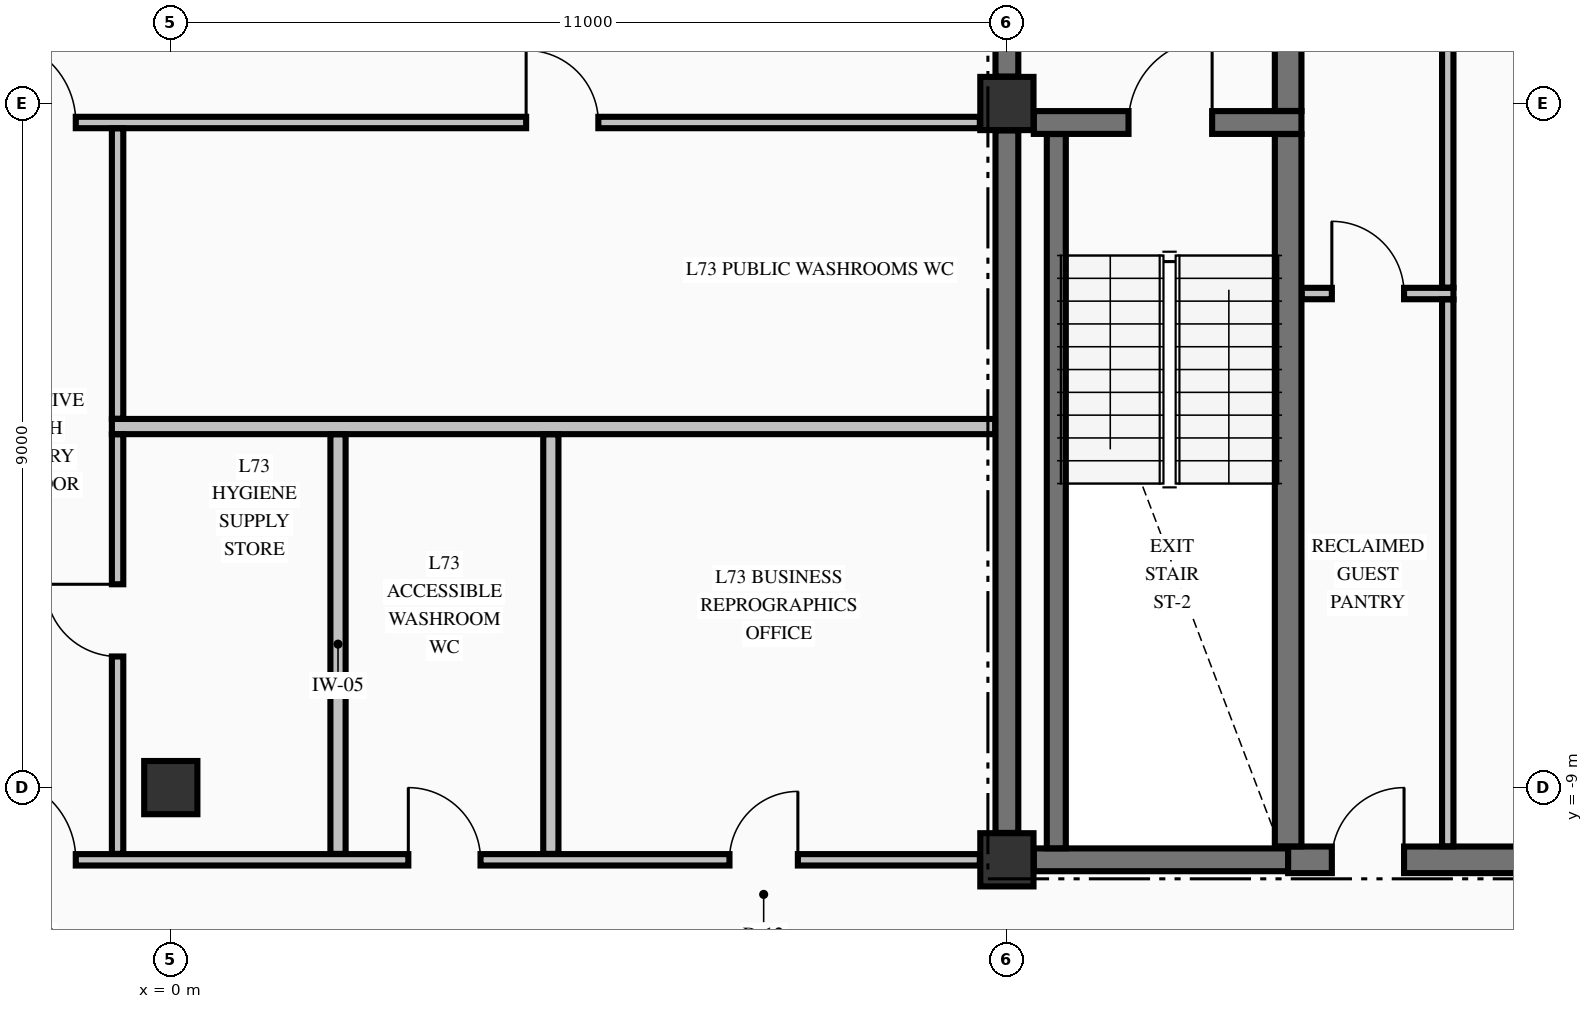
"""IFC4 building model, lengths in metres.
Left out: names, types, materials, properties, quantities, classifications, styles, units other than length and angle.
Written with IfcOpenShell. Run it as: python <this file> out.ifc"""

import sys

from ifc_helpers import new_model, si_unit, direction, frame, frame_2d, origin, origin_2d, place, context, subcontext, project, spatial, rectangle, extrude, element, fill, save


model = new_model("IFC4")
c1 = context("Model", 3, precision=1e-05, world=origin(), true_north=direction((0.0, 1.0)))
c2 = subcontext(c1, "Body", "Model", "MODEL_VIEW")
j1 = project(units=[si_unit("LENGTHUNIT", "METRE"), si_unit("PLANEANGLEUNIT", "RADIAN")], contexts=[c1])
p1 = place(None, origin())
s1 = spatial("IfcSite", under=j1, at=p1, CompositionType="ELEMENT")
p2 = place(p1, origin())
s2 = spatial("IfcBuilding", under=s1, at=p2, CompositionType="ELEMENT")
p3 = place(p2, frame((0.0, 0.0, 274.32)))
s3 = spatial("IfcBuildingStorey", under=s2, at=p3, CompositionType="ELEMENT", Elevation=274.32)
for number, where, z_axis, x_axis in (
    (1, (11.0, -9.95, -0.25), (0.0, 0.0, 1.0), (1.0, 0.0, 0.0)),
    (2, (11.0, 0.0, -0.25), (0.0, 0.0, 1.0), (1.0, 0.0, 0.0)),
    (3, (0.0, -9.0, -0.25), (0.0, 0.0, 1.0), (1.0, 0.0, 0.0)),
):
    element("IfcColumn", number, at=place(p3, frame(where, z_axis=z_axis, x_axis=x_axis)), inside=s3, PredefinedType="COLUMN", context=c2, shape_type="SweptSolid", body=[
        extrude(rectangle(XDim=0.7, YDim=0.7, at=origin_2d()), origin(), (0.0, 0.0, 1.0), 3.565),
    ])
p4 = place(p3, frame((11.354, -9.95, 0.0), z_axis=(0.0, 0.0, 1.0), x_axis=(1.0, 0.0, 0.0)))
e4 = element("IfcWall", 4, at=p4, inside=s3, PredefinedType="SHEAR", context=c2, shape_type="SweptSolid", body=[
    extrude(rectangle(XDim=3.346, YDim=0.3, at=frame_2d((1.673, 0.0))), origin(), (0.0, 0.0, 1.0), 3.315),
])
p5 = place(p3, frame((14.7, -9.95, 0.0), z_axis=(0.0, 0.0, 1.0), x_axis=(1.0, 0.0, 0.0)))
e5 = element("IfcWall", 5, at=p5, inside=s3, PredefinedType="SHEAR", context=c2, shape_type="SweptSolid", body=[
    extrude(rectangle(XDim=4.946, YDim=0.35, at=frame_2d((2.473, 0.0))), origin(), (0.0, 0.0, 1.0), 3.315),
])
p6 = place(p5, frame((3.25, 0.0, 0.0)))
e6 = element("IfcOpeningElement", 6, at=p6, cuts=e5, PredefinedType="OPENING", context=c2, shape_type="SweptSolid", body=[
    extrude(rectangle(XDim=0.9, YDim=2.15, at=frame_2d((0.45, 1.075))), frame((0.0, 0.185, 0.0), z_axis=(0.0, -1.0, 0.0), x_axis=(1.0, 0.0, 0.0)), (0.0, 0.0, 1.0), 0.37),
])
p7 = place(p5, frame((0.575, 0.0, 0.0)))
e7 = element("IfcOpeningElement", 7, at=p7, cuts=e5, PredefinedType="OPENING", context=c2, shape_type="SweptSolid", body=[
    extrude(rectangle(XDim=0.95, YDim=2.15, at=frame_2d((0.475, 1.075))), frame((0.0, 0.185, 0.0), z_axis=(0.0, -1.0, 0.0), x_axis=(1.0, 0.0, 0.0)), (0.0, 0.0, 1.0), 0.37),
])
p8 = place(p3, frame((11.354, -0.25, 0.0), z_axis=(0.0, 0.0, 1.0), x_axis=(1.0, 0.0, 0.0)))
e8 = element("IfcWall", 8, at=p8, inside=s3, PredefinedType="SHEAR", context=c2, shape_type="SweptSolid", body=[
    extrude(rectangle(XDim=3.521, YDim=0.3, at=frame_2d((1.76, 0.0))), origin(), (0.0, 0.0, 1.0), 3.315),
])
p9 = place(p8, frame((1.246, 0.0, 0.0)))
e9 = element("IfcOpeningElement", 9, at=p9, cuts=e8, PredefinedType="OPENING", context=c2, shape_type="SweptSolid", body=[
    extrude(rectangle(XDim=1.1, YDim=2.15, at=frame_2d((0.55, 1.075))), frame((0.0, 0.16, 0.0), z_axis=(0.0, -1.0, 0.0), x_axis=(1.0, 0.0, 0.0)), (0.0, 0.0, 1.0), 0.32),
])
p10 = place(p3, frame((-10.644, -9.95, 0.0), z_axis=(0.0, 0.0, 1.0), x_axis=(1.0, 0.0, 0.0)))
e10 = element("IfcWall", 10, at=p10, inside=s3, PredefinedType="PARTITIONING", context=c2, shape_type="SweptSolid", body=[
    extrude(rectangle(XDim=21.288, YDim=0.15, at=frame_2d((10.644, 0.0))), origin(), (0.0, 0.0, 1.0), 3.315),
])
p11 = place(p10, frame((8.294, 0.0, 0.0)))
e11 = element("IfcOpeningElement", 11, at=p11, cuts=e10, PredefinedType="OPENING", context=c2, shape_type="SweptSolid", body=[
    extrude(rectangle(XDim=1.1, YDim=2.15, at=frame_2d((0.55, 1.075))), frame((0.0, 0.085, 0.0), z_axis=(0.0, -1.0, 0.0), x_axis=(1.0, 0.0, 0.0)), (0.0, 0.0, 1.0), 0.17),
])
p12 = place(p10, frame((13.769, 0.0, 0.0)))
e12 = element("IfcOpeningElement", 12, at=p12, cuts=e10, PredefinedType="OPENING", context=c2, shape_type="SweptSolid", body=[
    extrude(rectangle(XDim=0.95, YDim=2.15, at=frame_2d((0.475, 1.075))), frame((0.0, 0.085, 0.0), z_axis=(0.0, -1.0, 0.0), x_axis=(1.0, 0.0, 0.0)), (0.0, 0.0, 1.0), 0.17),
])
p13 = place(p10, frame((17.994, 0.0, 0.0)))
e13 = element("IfcOpeningElement", 13, at=p13, cuts=e10, PredefinedType="OPENING", context=c2, shape_type="SweptSolid", body=[
    extrude(rectangle(XDim=0.9, YDim=2.15, at=frame_2d((0.45, 1.075))), frame((0.0, 0.085, 0.0), z_axis=(0.0, -1.0, 0.0), x_axis=(1.0, 0.0, 0.0)), (0.0, 0.0, 1.0), 0.17),
])
p14 = place(p3, frame((-0.775, -4.25, 0.0), z_axis=(0.0, 0.0, 1.0), x_axis=(1.0, 0.0, 0.0)))
e14 = element("IfcWall", 14, at=p14, inside=s3, PredefinedType="PARTITIONING", context=c2, shape_type="SweptSolid", body=[
    extrude(rectangle(XDim=11.622, YDim=0.2, at=frame_2d((5.811, 0.0))), origin(), (0.0, 0.0, 1.0), 3.315),
])
p15 = place(p3, frame((14.878, -2.5, 0.0), z_axis=(0.0, 0.0, 1.0), x_axis=(1.0, 0.0, 0.0)))
e15 = element("IfcWall", 15, at=p15, inside=s3, PredefinedType="PARTITIONING", context=c2, shape_type="SweptSolid", body=[
    extrude(rectangle(XDim=1.997, YDim=0.15, at=frame_2d((0.999, 0.0))), origin(), (0.0, 0.0, 1.0), 3.315),
])
p16 = place(p15, frame((0.397, 0.0, 0.0)))
e16 = element("IfcOpeningElement", 16, at=p16, cuts=e15, PredefinedType="OPENING", context=c2, shape_type="SweptSolid", body=[
    extrude(rectangle(XDim=0.95, YDim=2.15, at=frame_2d((0.475, 1.075))), frame((0.0, 0.085, 0.0), z_axis=(0.0, -1.0, 0.0), x_axis=(1.0, 0.0, 0.0)), (0.0, 0.0, 1.0), 0.17),
])
p17 = place(p3, frame((-10.644, -0.25, 0.0), z_axis=(0.0, 0.0, 1.0), x_axis=(1.0, 0.0, 0.0)))
e17 = element("IfcWall", 17, at=p17, inside=s3, PredefinedType="PARTITIONING", context=c2, shape_type="SweptSolid", body=[
    extrude(rectangle(XDim=21.288, YDim=0.15, at=frame_2d((10.644, 0.0))), origin(), (0.0, 0.0, 1.0), 3.315),
])
p18 = place(p17, frame((8.294, 0.0, 0.0)))
e18 = element("IfcOpeningElement", 18, at=p18, cuts=e17, PredefinedType="OPENING", context=c2, shape_type="SweptSolid", body=[
    extrude(rectangle(XDim=1.1, YDim=2.15, at=frame_2d((0.55, 1.075))), frame((0.0, 0.085, 0.0), z_axis=(0.0, -1.0, 0.0), x_axis=(1.0, 0.0, 0.0)), (0.0, 0.0, 1.0), 0.17),
])
p19 = place(p17, frame((3.169, 0.0, 0.0)))
e19 = element("IfcOpeningElement", 19, at=p19, cuts=e17, PredefinedType="OPENING", context=c2, shape_type="SweptSolid", body=[
    extrude(rectangle(XDim=1.05, YDim=2.15, at=frame_2d((0.525, 1.075))), frame((0.0, 0.085, 0.0), z_axis=(0.0, -1.0, 0.0), x_axis=(1.0, 0.0, 0.0)), (0.0, 0.0, 1.0), 0.17),
])
p20 = place(p17, frame((15.319, 0.0, 0.0)))
e20 = element("IfcOpeningElement", 20, at=p20, cuts=e17, PredefinedType="OPENING", context=c2, shape_type="SweptSolid", body=[
    extrude(rectangle(XDim=0.95, YDim=2.15, at=frame_2d((0.475, 1.075))), frame((0.0, 0.085, 0.0), z_axis=(0.0, -1.0, 0.0), x_axis=(1.0, 0.0, 0.0)), (0.0, 0.0, 1.0), 0.17),
])
p21 = place(p3, frame((11.0, -9.596, 0.0), z_axis=(0.0, 0.0, 1.0), x_axis=(0.0, 1.0, 0.0)))
e21 = element("IfcWall", 21, at=p21, inside=s3, PredefinedType="SHEAR", context=c2, shape_type="SweptSolid", body=[
    extrude(rectangle(XDim=9.242, YDim=0.3, at=frame_2d((4.621, 0.0))), origin(), (0.0, 0.0, 1.0), 3.315),
])
p22 = place(p3, frame((11.0, 0.354, 0.0), z_axis=(0.0, 0.0, 1.0), x_axis=(0.0, 1.0, 0.0)))
e22 = element("IfcWall", 22, at=p22, inside=s3, PredefinedType="SHEAR", context=c2, shape_type="SweptSolid", body=[
    extrude(rectangle(XDim=2.394, YDim=0.3, at=frame_2d((1.197, 0.0))), origin(), (0.0, 0.0, 1.0), 3.315),
])
p23 = place(p22, frame((0.746, 0.0, 0.0)))
e23 = element("IfcOpeningElement", 23, at=p23, cuts=e22, PredefinedType="OPENING", context=c2, shape_type="SweptSolid", body=[
    extrude(rectangle(XDim=1.1, YDim=2.15, at=frame_2d((0.55, 1.075))), frame((0.0, 0.16, 0.0), z_axis=(0.0, -1.0, 0.0), x_axis=(1.0, 0.0, 0.0)), (0.0, 0.0, 1.0), 0.32),
])
p24 = place(p3, frame((11.65, -9.798, 0.0), z_axis=(0.0, 0.0, 1.0), x_axis=(0.0, 1.0, 0.0)))
e24 = element("IfcWall", 24, at=p24, inside=s3, PredefinedType="SOLIDWALL", context=c2, shape_type="SweptSolid", body=[
    extrude(rectangle(XDim=9.396, YDim=0.25, at=frame_2d((4.698, 0.0))), origin(), (0.0, 0.0, 1.0), 3.315),
])
p25 = place(p3, frame((14.7, -9.773, 0.0), z_axis=(0.0, 0.0, 1.0), x_axis=(0.0, 1.0, 0.0)))
e25 = element("IfcWall", 25, at=p25, inside=s3, PredefinedType="SHEAR", context=c2, shape_type="SweptSolid", body=[
    extrude(rectangle(XDim=9.371, YDim=0.35, at=frame_2d((4.686, 0.0))), origin(), (0.0, 0.0, 1.0), 3.315),
])
p26 = place(p3, frame((14.7, -0.098, 0.0), z_axis=(0.0, 0.0, 1.0), x_axis=(0.0, 1.0, 0.0)))
e26 = element("IfcWall", 26, at=p26, inside=s3, PredefinedType="SHEAR", context=c2, shape_type="SweptSolid", body=[
    extrude(rectangle(XDim=2.846, YDim=0.35, at=frame_2d((1.423, 0.0))), origin(), (0.0, 0.0, 1.0), 3.315),
])
p27 = place(p3, frame((-0.7, -9.872, 0.0), z_axis=(0.0, 0.0, 1.0), x_axis=(0.0, 1.0, 0.0)))
e27 = element("IfcWall", 27, at=p27, inside=s3, PredefinedType="PARTITIONING", context=c2, shape_type="SweptSolid", body=[
    extrude(rectangle(XDim=5.519, YDim=0.15, at=frame_2d((2.76, 0.0))), origin(), (0.0, 0.0, 1.0), 3.315),
])
p28 = place(p27, frame((2.597, 0.0, 0.0)))
e28 = element("IfcOpeningElement", 28, at=p28, cuts=e27, PredefinedType="OPENING", context=c2, shape_type="SweptSolid", body=[
    extrude(rectangle(XDim=0.95, YDim=2.15, at=frame_2d((0.475, 1.075))), frame((0.0, 0.085, 0.0), z_axis=(0.0, -1.0, 0.0), x_axis=(1.0, 0.0, 0.0)), (0.0, 0.0, 1.0), 0.17),
])
p29 = place(p3, frame((-0.7, -4.147, 0.0), z_axis=(0.0, 0.0, 1.0), x_axis=(0.0, 1.0, 0.0)))
e29 = element("IfcWall", 29, at=p29, inside=s3, PredefinedType="PARTITIONING", context=c2, shape_type="SweptSolid", body=[
    extrude(rectangle(XDim=3.819, YDim=0.15, at=frame_2d((1.91, 0.0))), origin(), (0.0, 0.0, 1.0), 3.315),
])
for number, where, z_axis, x_axis in (
    (30, (2.2, -9.872, 0.0), (0.0, 0.0, 1.0), (0.0, 1.0, 0.0)),
    (31, (5.0, -9.872, 0.0), (0.0, 0.0, 1.0), (0.0, 1.0, 0.0)),
):
    element("IfcWall", number, at=place(p3, frame(where, z_axis=z_axis, x_axis=x_axis)), inside=s3, PredefinedType="PARTITIONING", context=c2, shape_type="SweptSolid", body=[
        extrude(rectangle(XDim=5.519, YDim=0.2, at=frame_2d((2.76, 0.0))), origin(), (0.0, 0.0, 1.0), 3.315),
    ])
p30 = place(p3, frame((16.8, -9.772, 0.0), z_axis=(0.0, 0.0, 1.0), x_axis=(0.0, 1.0, 0.0)))
e32 = element("IfcWall", 32, at=p30, inside=s3, PredefinedType="PARTITIONING", context=c2, shape_type="SweptSolid", body=[
    extrude(rectangle(XDim=7.194, YDim=0.15, at=frame_2d((3.597, 0.0))), origin(), (0.0, 0.0, 1.0), 3.315),
])
p31 = place(p3, frame((16.8, -2.422, 0.0), z_axis=(0.0, 0.0, 1.0), x_axis=(0.0, 1.0, 0.0)))
e33 = element("IfcWall", 33, at=p31, inside=s3, PredefinedType="PARTITIONING", context=c2, shape_type="SweptSolid", body=[
    extrude(rectangle(XDim=7.144, YDim=0.15, at=frame_2d((3.572, 0.0))), origin(), (0.0, 0.0, 1.0), 3.315),
])
p32 = place(p9, origin())
e34 = element("IfcDoor", 34, at=p32, inside=s3, OperationType="SINGLE_SWING_RIGHT", PredefinedType="DOOR", context=c2, shape_type="SweptSolid", body=[
    extrude(rectangle(XDim=1.1, YDim=2.15, at=frame_2d((0.55, 1.075))), frame((0.0, 0.025, 0.0), z_axis=(0.0, -1.0, 0.0), x_axis=(1.0, 0.0, 0.0)), (0.0, 0.0, 1.0), 0.05),
])
fill(e9, e34)
p33 = place(p7, origin())
e35 = element("IfcDoor", 35, at=p33, inside=s3, OperationType="SINGLE_SWING_RIGHT", PredefinedType="DOOR", context=c2, shape_type="SweptSolid", body=[
    extrude(rectangle(XDim=0.95, YDim=2.15, at=frame_2d((0.475, 1.075))), frame((0.0, 0.025, 0.0), z_axis=(0.0, -1.0, 0.0), x_axis=(1.0, 0.0, 0.0)), (0.0, 0.0, 1.0), 0.05),
])
fill(e7, e35)
p34 = place(p16, origin())
e36 = element("IfcDoor", 36, at=p34, inside=s3, OperationType="SINGLE_SWING_LEFT", PredefinedType="DOOR", context=c2, shape_type="SweptSolid", body=[
    extrude(rectangle(XDim=0.95, YDim=2.15, at=frame_2d((0.475, 1.075))), frame((0.0, 0.025, 0.0), z_axis=(0.0, -1.0, 0.0), x_axis=(1.0, 0.0, 0.0)), (0.0, 0.0, 1.0), 0.05),
])
fill(e16, e36)
p35 = place(p11, origin())
e37 = element("IfcDoor", 37, at=p35, inside=s3, OperationType="SINGLE_SWING_LEFT", PredefinedType="DOOR", context=c2, shape_type="SweptSolid", body=[
    extrude(rectangle(XDim=1.1, YDim=2.15, at=frame_2d((0.55, 1.075))), frame((0.0, 0.025, 0.0), z_axis=(0.0, -1.0, 0.0), x_axis=(1.0, 0.0, 0.0)), (0.0, 0.0, 1.0), 0.05),
])
fill(e11, e37)
p36 = place(p18, origin())
e38 = element("IfcDoor", 38, at=p36, inside=s3, OperationType="SINGLE_SWING_LEFT", PredefinedType="DOOR", context=c2, shape_type="SweptSolid", body=[
    extrude(rectangle(XDim=1.1, YDim=2.15, at=frame_2d((0.55, 1.075))), frame((0.0, 0.025, 0.0), z_axis=(0.0, -1.0, 0.0), x_axis=(1.0, 0.0, 0.0)), (0.0, 0.0, 1.0), 0.05),
])
fill(e18, e38)
p37 = place(p20, origin())
e39 = element("IfcDoor", 39, at=p37, inside=s3, OperationType="SINGLE_SWING_LEFT", PredefinedType="DOOR", context=c2, shape_type="SweptSolid", body=[
    extrude(rectangle(XDim=0.95, YDim=2.15, at=frame_2d((0.475, 1.075))), frame((0.0, 0.025, 0.0), z_axis=(0.0, -1.0, 0.0), x_axis=(1.0, 0.0, 0.0)), (0.0, 0.0, 1.0), 0.05),
])
fill(e20, e39)
p38 = place(p28, origin())
e40 = element("IfcDoor", 40, at=p38, inside=s3, OperationType="SINGLE_SWING_RIGHT", PredefinedType="DOOR", context=c2, shape_type="SweptSolid", body=[
    extrude(rectangle(XDim=0.95, YDim=2.15, at=frame_2d((0.475, 1.075))), frame((0.0, 0.025, 0.0), z_axis=(0.0, -1.0, 0.0), x_axis=(1.0, 0.0, 0.0)), (0.0, 0.0, 1.0), 0.05),
])
fill(e28, e40)
p39 = place(p12, origin())
e41 = element("IfcDoor", 41, at=p39, inside=s3, OperationType="SINGLE_SWING_LEFT", PredefinedType="DOOR", context=c2, shape_type="SweptSolid", body=[
    extrude(rectangle(XDim=0.95, YDim=2.15, at=frame_2d((0.475, 1.075))), frame((0.0, 0.025, 0.0), z_axis=(0.0, -1.0, 0.0), x_axis=(1.0, 0.0, 0.0)), (0.0, 0.0, 1.0), 0.05),
])
fill(e12, e41)
p40 = place(p13, origin())
e42 = element("IfcDoor", 42, at=p40, inside=s3, OperationType="SINGLE_SWING_RIGHT", PredefinedType="DOOR", context=c2, shape_type="SweptSolid", body=[
    extrude(rectangle(XDim=0.9, YDim=2.15, at=frame_2d((0.45, 1.075))), frame((0.0, 0.025, 0.0), z_axis=(0.0, -1.0, 0.0), x_axis=(1.0, 0.0, 0.0)), (0.0, 0.0, 1.0), 0.05),
])
fill(e13, e42)
save(model, sys.argv[1])
